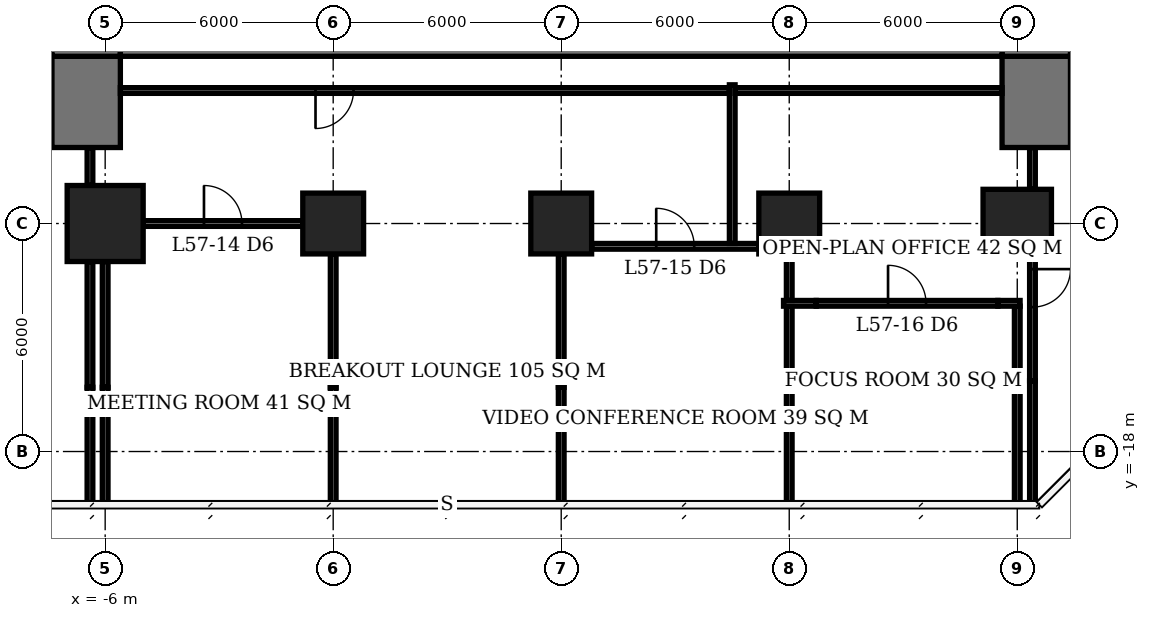
"""IFC4 building model, lengths in metres.
Left out: names, types, materials, properties, quantities, classifications, styles, units other than length and angle.
Written with IfcOpenShell. Run it as: python <this file> out.ifc"""

import sys

from ifc_helpers import new_model, si_unit, direction, frame, frame_2d, origin, origin_2d, place, context, subcontext, project, spatial, rectangle, extrude, element, fill, save


model = new_model("IFC4")
c1 = context("Model", 3, precision=1e-05, world=origin(), true_north=direction((0.0, 1.0)))
c2 = subcontext(c1, "Body", "Model", "MODEL_VIEW")
j1 = project(units=[si_unit("LENGTHUNIT", "METRE"), si_unit("PLANEANGLEUNIT", "RADIAN")], contexts=[c1])
p1 = place(None, origin())
s1 = spatial("IfcSite", under=j1, at=p1, CompositionType="ELEMENT")
p2 = place(p1, origin())
s2 = spatial("IfcBuilding", under=s1, at=p2, CompositionType="ELEMENT")
p3 = place(p2, frame((0.0, 0.0, 231.8)))
s3 = spatial("IfcBuildingStorey", under=s2, at=p3, CompositionType="ELEMENT", Elevation=231.8)
p4 = place(p3, frame((-6.0, -12.0, 0.0), z_axis=(0.0, 0.0, 1.0), x_axis=(1.0, 0.0, 0.0)))
e1 = element("IfcColumn", 1, at=p4, inside=s3, PredefinedType="COLUMN", context=c2, shape_type="SweptSolid", body=[
    extrude(rectangle(XDim=2.0, YDim=2.0, at=origin_2d()), origin(), (0.0, 0.0, 1.0), 3.9),
])
for number, where, z_axis, x_axis in (
    (2, (0.0, -12.0, 0.0), (0.0, 0.0, 1.0), (1.0, 0.0, 0.0)),
    (3, (6.0, -12.0, 0.0), (0.0, 0.0, 1.0), (1.0, 0.0, 0.0)),
    (4, (12.0, -12.0, 0.0), (0.0, 0.0, 1.0), (1.0, 0.0, 0.0)),
):
    element("IfcColumn", number, at=place(p3, frame(where, z_axis=z_axis, x_axis=x_axis)), inside=s3, PredefinedType="COLUMN", context=c2, shape_type="SweptSolid", body=[
        extrude(rectangle(XDim=1.6, YDim=1.6, at=origin_2d()), origin(), (0.0, 0.0, 1.0), 3.9),
    ])
p5 = place(p3, frame((18.0, -12.0, 0.0), z_axis=(0.0, 0.0, 1.0), x_axis=(1.0, 0.0, 0.0)))
e5 = element("IfcColumn", 5, at=p5, inside=s3, PredefinedType="COLUMN", context=c2, shape_type="SweptSolid", body=[
    extrude(rectangle(XDim=1.8, YDim=1.8, at=origin_2d()), origin(), (0.0, 0.0, 1.0), 3.9),
])
p6 = place(p3, frame((-5.6, -6.6, 0.0), z_axis=(0.0, 0.0, 1.0), x_axis=(1.0, 0.0, 0.0)))
e6 = element("IfcWall", 6, at=p6, inside=s3, PredefinedType="SHEAR", context=c2, shape_type="SweptSolid", body=[
    extrude(rectangle(XDim=23.2, YDim=2.0, at=frame_2d((11.6, 0.0))), origin(), (0.0, 0.0, 1.0), 3.9),
])
p7 = place(p3, frame((-6.5, -7.6, 0.0), z_axis=(0.0, 0.0, 1.0), x_axis=(0.0, 1.0, 0.0)))
e7 = element("IfcWall", 7, at=p7, inside=s3, PredefinedType="SHEAR", context=c2, shape_type="SweptSolid", body=[
    extrude(rectangle(XDim=21.2, YDim=1.8, at=frame_2d((10.6, 0.0))), origin(), (0.0, 0.0, 1.0), 3.9),
])
p8 = place(p7, frame((7.8, 0.0, 0.0)))
e8 = element("IfcOpeningElement", 8, at=p8, cuts=e7, PredefinedType="OPENING", context=c2, shape_type="SweptSolid", body=[
    extrude(rectangle(XDim=1.8, YDim=2.4, at=frame_2d((0.9, 1.2))), frame((0.0, 0.91, 0.0), z_axis=(0.0, -1.0, 0.0), x_axis=(1.0, 0.0, 0.0)), (0.0, 0.0, 1.0), 1.82),
])
p9 = place(p3, frame((18.5, -7.6, 0.0), z_axis=(0.0, 0.0, 1.0), x_axis=(0.0, 1.0, 0.0)))
e9 = element("IfcWall", 9, at=p9, inside=s3, PredefinedType="SHEAR", context=c2, shape_type="SweptSolid", body=[
    extrude(rectangle(XDim=21.2, YDim=1.8, at=frame_2d((10.6, 0.0))), origin(), (0.0, 0.0, 1.0), 3.9),
])
p10 = place(p9, frame((9.2, 0.0, 0.0)))
e10 = element("IfcOpeningElement", 10, at=p10, cuts=e9, PredefinedType="OPENING", context=c2, shape_type="SweptSolid", body=[
    extrude(rectangle(XDim=1.8, YDim=2.4, at=frame_2d((0.9, 1.2))), frame((0.0, 0.91, 0.0), z_axis=(0.0, -1.0, 0.0), x_axis=(1.0, 0.0, 0.0)), (0.0, 0.0, 1.0), 1.82),
])
for number, where, z_axis, x_axis in (
    (11, (-6.5, -10.0, 0.0), (0.0, 0.0, 1.0), (0.0, 1.0, 0.0)),
    (12, (18.5, -10.0, 0.0), (0.0, 0.0, 1.0), (0.0, 1.0, 0.0)),
):
    element("IfcWall", number, at=place(p3, frame(where, z_axis=z_axis, x_axis=x_axis)), inside=s3, PredefinedType="SHEAR", context=c2, shape_type="SweptSolid", body=[
        extrude(rectangle(XDim=2.4, YDim=1.8, at=frame_2d((1.2, 0.0))), origin(), (0.0, 0.0, 1.0), 3.9),
    ])
p11 = place(p3, frame((11.85, -14.1, 0.0), z_axis=(0.0, 0.0, 1.0), x_axis=(1.0, 0.0, 0.0)))
e13 = element("IfcWall", 13, at=p11, inside=s3, PredefinedType="PARTITIONING", context=c2, shape_type="SweptSolid", body=[
    extrude(rectangle(XDim=0.86, YDim=0.15, at=frame_2d((0.43, 0.0))), origin(), (0.0, 0.0, 1.0), 2.65),
])
p12 = place(p3, frame((12.71, -14.1, 0.0), z_axis=(0.0, 0.0, 1.0), x_axis=(1.0, 0.0, 0.0)))
e14 = element("IfcWall", 14, at=p12, inside=s3, PredefinedType="PARTITIONING", context=c2, shape_type="SweptSolid", body=[
    extrude(rectangle(XDim=4.78, YDim=0.15, at=frame_2d((2.39, 0.0))), origin(), (0.0, 0.0, 1.0), 3.65),
])
p13 = place(p12, frame((1.89, 0.0, 0.0)))
e15 = element("IfcOpeningElement", 15, at=p13, cuts=e14, PredefinedType="OPENING", context=c2, shape_type="SweptSolid", body=[
    extrude(rectangle(XDim=1.0, YDim=2.1, at=frame_2d((0.5, 1.05))), frame((0.0, 0.085, 0.0), z_axis=(0.0, -1.0, 0.0), x_axis=(1.0, 0.0, 0.0)), (0.0, 0.0, 1.0), 0.17),
])
p14 = place(p3, frame((17.49, -14.1, 0.0), z_axis=(0.0, 0.0, 1.0), x_axis=(1.0, 0.0, 0.0)))
e16 = element("IfcWall", 16, at=p14, inside=s3, PredefinedType="PARTITIONING", context=c2, shape_type="SweptSolid", body=[
    extrude(rectangle(XDim=0.585, YDim=0.15, at=frame_2d((0.292, 0.0))), origin(), (0.0, 0.0, 1.0), 2.65),
])
p15 = place(p3, frame((6.8, -12.6, 0.0), z_axis=(0.0, 0.0, 1.0), x_axis=(1.0, 0.0, 0.0)))
e17 = element("IfcWall", 17, at=p15, inside=s3, PredefinedType="PARTITIONING", context=c2, shape_type="SweptSolid", body=[
    extrude(rectangle(XDim=4.4, YDim=0.15, at=frame_2d((2.2, 0.0))), origin(), (0.0, 0.0, 1.0), 3.65),
])
p16 = place(p15, frame((1.7, 0.0, 0.0)))
e18 = element("IfcOpeningElement", 18, at=p16, cuts=e17, PredefinedType="OPENING", context=c2, shape_type="SweptSolid", body=[
    extrude(rectangle(XDim=1.0, YDim=2.1, at=frame_2d((0.5, 1.05))), frame((0.0, 0.085, 0.0), z_axis=(0.0, -1.0, 0.0), x_axis=(1.0, 0.0, 0.0)), (0.0, 0.0, 1.0), 0.17),
])
p17 = place(p3, frame((-5.0, -12.0, 0.0), z_axis=(0.0, 0.0, 1.0), x_axis=(1.0, 0.0, 0.0)))
e19 = element("IfcWall", 19, at=p17, inside=s3, PredefinedType="PARTITIONING", context=c2, shape_type="SweptSolid", body=[
    extrude(rectangle(XDim=4.2, YDim=0.15, at=frame_2d((2.1, 0.0))), origin(), (0.0, 0.0, 1.0), 3.65),
])
p18 = place(p17, frame((1.6, 0.0, 0.0)))
e20 = element("IfcOpeningElement", 20, at=p18, cuts=e19, PredefinedType="OPENING", context=c2, shape_type="SweptSolid", body=[
    extrude(rectangle(XDim=1.0, YDim=2.1, at=frame_2d((0.5, 1.05))), frame((0.0, 0.085, 0.0), z_axis=(0.0, -1.0, 0.0), x_axis=(1.0, 0.0, 0.0)), (0.0, 0.0, 1.0), 0.17),
])
p19 = place(p3, frame((-6.0, -19.4, 0.0), z_axis=(0.0, 0.0, 1.0), x_axis=(0.0, 1.0, 0.0)))
e21 = element("IfcWall", 21, at=p19, inside=s3, PredefinedType="PARTITIONING", context=c2, shape_type="SweptSolid", body=[
    extrude(rectangle(XDim=3.09, YDim=0.15, at=frame_2d((1.545, 0.0))), origin(), (0.0, 0.0, 1.0), 3.65),
])
p20 = place(p3, frame((-6.0, -16.31, 0.0), z_axis=(0.0, 0.0, 1.0), x_axis=(0.0, 1.0, 0.0)))
e22 = element("IfcWall", 22, at=p20, inside=s3, PredefinedType="PARTITIONING", context=c2, shape_type="SweptSolid", body=[
    extrude(rectangle(XDim=3.31, YDim=0.15, at=frame_2d((1.655, 0.0))), origin(), (0.0, 0.0, 1.0), 2.65),
])
p21 = place(p3, frame((0.0, -19.35, 0.0), z_axis=(0.0, 0.0, 1.0), x_axis=(0.0, 1.0, 0.0)))
e23 = element("IfcWall", 23, at=p21, inside=s3, PredefinedType="PARTITIONING", context=c2, shape_type="SweptSolid", body=[
    extrude(rectangle(XDim=3.04, YDim=0.15, at=frame_2d((1.52, 0.0))), origin(), (0.0, 0.0, 1.0), 3.65),
])
p22 = place(p3, frame((0.0, -16.31, 0.0), z_axis=(0.0, 0.0, 1.0), x_axis=(0.0, 1.0, 0.0)))
e24 = element("IfcWall", 24, at=p22, inside=s3, PredefinedType="PARTITIONING", context=c2, shape_type="SweptSolid", body=[
    extrude(rectangle(XDim=3.51, YDim=0.15, at=frame_2d((1.755, 0.0))), origin(), (0.0, 0.0, 1.0), 2.65),
])
p23 = place(p3, frame((6.0, -19.35, 0.0), z_axis=(0.0, 0.0, 1.0), x_axis=(0.0, 1.0, 0.0)))
e25 = element("IfcWall", 25, at=p23, inside=s3, PredefinedType="PARTITIONING", context=c2, shape_type="SweptSolid", body=[
    extrude(rectangle(XDim=3.04, YDim=0.15, at=frame_2d((1.52, 0.0))), origin(), (0.0, 0.0, 1.0), 3.65),
])
p24 = place(p3, frame((6.0, -16.31, 0.0), z_axis=(0.0, 0.0, 1.0), x_axis=(0.0, 1.0, 0.0)))
e26 = element("IfcWall", 26, at=p24, inside=s3, PredefinedType="PARTITIONING", context=c2, shape_type="SweptSolid", body=[
    extrude(rectangle(XDim=3.51, YDim=0.15, at=frame_2d((1.755, 0.0))), origin(), (0.0, 0.0, 1.0), 2.65),
])
p25 = place(p3, frame((12.0, -19.4, 0.0), z_axis=(0.0, 0.0, 1.0), x_axis=(0.0, 1.0, 0.0)))
e27 = element("IfcWall", 27, at=p25, inside=s3, PredefinedType="PARTITIONING", context=c2, shape_type="SweptSolid", body=[
    extrude(rectangle(XDim=3.09, YDim=0.15, at=frame_2d((1.545, 0.0))), origin(), (0.0, 0.0, 1.0), 3.65),
])
p26 = place(p3, frame((12.0, -16.31, 0.0), z_axis=(0.0, 0.0, 1.0), x_axis=(0.0, 1.0, 0.0)))
e28 = element("IfcWall", 28, at=p26, inside=s3, PredefinedType="PARTITIONING", context=c2, shape_type="SweptSolid", body=[
    extrude(rectangle(XDim=2.135, YDim=0.15, at=frame_2d((1.067, 0.0))), origin(), (0.0, 0.0, 1.0), 2.65),
])
p27 = place(p3, frame((12.0, -14.025, 0.0), z_axis=(0.0, 0.0, 1.0), x_axis=(0.0, 1.0, 0.0)))
e29 = element("IfcWall", 29, at=p27, inside=s3, PredefinedType="PARTITIONING", context=c2, shape_type="SweptSolid", body=[
    extrude(rectangle(XDim=1.225, YDim=0.15, at=frame_2d((0.612, 0.0))), origin(), (0.0, 0.0, 1.0), 2.65),
])
p28 = place(p3, frame((18.0, -19.4, 0.0), z_axis=(0.0, 0.0, 1.0), x_axis=(0.0, 1.0, 0.0)))
e30 = element("IfcWall", 30, at=p28, inside=s3, PredefinedType="PARTITIONING", context=c2, shape_type="SweptSolid", body=[
    extrude(rectangle(XDim=3.09, YDim=0.15, at=frame_2d((1.545, 0.0))), origin(), (0.0, 0.0, 1.0), 3.65),
])
p29 = place(p3, frame((18.0, -16.31, 0.0), z_axis=(0.0, 0.0, 1.0), x_axis=(0.0, 1.0, 0.0)))
e31 = element("IfcWall", 31, at=p29, inside=s3, PredefinedType="PARTITIONING", context=c2, shape_type="SweptSolid", body=[
    extrude(rectangle(XDim=2.135, YDim=0.15, at=frame_2d((1.067, 0.0))), origin(), (0.0, 0.0, 1.0), 2.65),
])
p30 = place(p3, frame((-6.4, -19.35, 0.0), z_axis=(0.0, 0.0, 1.0), x_axis=(0.0, 1.0, 0.0)))
e32 = element("IfcWall", 32, at=p30, inside=s3, PredefinedType="PARTITIONING", context=c2, shape_type="SweptSolid", body=[
    extrude(rectangle(XDim=3.04, YDim=0.15, at=frame_2d((1.52, 0.0))), origin(), (0.0, 0.0, 1.0), 3.65),
])
p31 = place(p3, frame((-6.4, -16.31, 0.0), z_axis=(0.0, 0.0, 1.0), x_axis=(0.0, 1.0, 0.0)))
e33 = element("IfcWall", 33, at=p31, inside=s3, PredefinedType="PARTITIONING", context=c2, shape_type="SweptSolid", body=[
    extrude(rectangle(XDim=3.31, YDim=0.15, at=frame_2d((1.655, 0.0))), origin(), (0.0, 0.0, 1.0), 2.65),
])
p32 = place(p3, frame((-6.4, -11.0, 0.0), z_axis=(0.0, 0.0, 1.0), x_axis=(0.0, 1.0, 0.0)))
e34 = element("IfcWall", 34, at=p32, inside=s3, PredefinedType="PARTITIONING", context=c2, shape_type="SweptSolid", body=[
    extrude(rectangle(XDim=1.0, YDim=0.15, at=frame_2d((0.5, 0.0))), origin(), (0.0, 0.0, 1.0), 3.65),
])
p33 = place(p3, frame((10.425, -8.5, 0.0), z_axis=(0.0, 0.0, 1.0), x_axis=(-1.0, 0.0, 0.0)))
e35 = element("IfcWall", 35, at=p33, inside=s3, PredefinedType="PARTITIONING", context=c2, shape_type="SweptSolid", body=[
    extrude(rectangle(XDim=16.025, YDim=0.15, at=frame_2d((8.013, 0.0))), origin(), (0.0, 0.0, 1.0), 3.65),
])
p34 = place(p33, frame((9.89, 0.0, 0.0)))
e36 = element("IfcOpeningElement", 36, at=p34, cuts=e35, PredefinedType="OPENING", context=c2, shape_type="SweptSolid", body=[
    extrude(rectangle(XDim=1.0, YDim=2.1, at=frame_2d((0.5, 1.05))), frame((0.0, 0.085, 0.0), z_axis=(0.0, -1.0, 0.0), x_axis=(1.0, 0.0, 0.0)), (0.0, 0.0, 1.0), 0.17),
])
p35 = place(p3, frame((10.5, -12.525, 0.0), z_axis=(0.0, 0.0, 1.0), x_axis=(0.0, 1.0, 0.0)))
e37 = element("IfcWall", 37, at=p35, inside=s3, PredefinedType="PARTITIONING", context=c2, shape_type="SweptSolid", body=[
    extrude(rectangle(XDim=4.175, YDim=0.15, at=frame_2d((2.087, 0.0))), origin(), (0.0, 0.0, 1.0), 3.65),
])
p36 = place(p3, frame((10.575, -8.5, 0.0), z_axis=(0.0, 0.0, 1.0), x_axis=(1.0, 0.0, 0.0)))
e38 = element("IfcWall", 38, at=p36, inside=s3, PredefinedType="PARTITIONING", context=c2, shape_type="SweptSolid", body=[
    extrude(rectangle(XDim=7.025, YDim=0.15, at=frame_2d((3.513, 0.0))), origin(), (0.0, 0.0, 1.0), 3.65),
])
p37 = place(p3, frame((18.4, -19.4, 0.0), z_axis=(0.0, 0.0, 1.0), x_axis=(0.0, 1.0, 0.0)))
e39 = element("IfcWall", 39, at=p37, inside=s3, PredefinedType="PARTITIONING", context=c2, shape_type="SweptSolid", body=[
    extrude(rectangle(XDim=3.26, YDim=0.15, at=frame_2d((1.63, 0.0))), origin(), (0.0, 0.0, 1.0), 3.65),
])
p38 = place(p3, frame((18.4, -12.9, 0.0), z_axis=(0.0, 0.0, 1.0), x_axis=(0.0, -1.0, 0.0)))
e40 = element("IfcWall", 40, at=p38, inside=s3, PredefinedType="PARTITIONING", context=c2, shape_type="SweptSolid", body=[
    extrude(rectangle(XDim=3.24, YDim=0.15, at=frame_2d((1.62, 0.0))), origin(), (0.0, 0.0, 1.0), 2.65),
])
p39 = place(p38, frame((0.3, 0.0, 0.0)))
e41 = element("IfcOpeningElement", 41, at=p39, cuts=e40, PredefinedType="OPENING", context=c2, shape_type="SweptSolid", body=[
    extrude(rectangle(XDim=1.0, YDim=2.1, at=frame_2d((0.5, 1.05))), frame((0.0, 0.085, 0.0), z_axis=(0.0, -1.0, 0.0), x_axis=(1.0, 0.0, 0.0)), (0.0, 0.0, 1.0), 0.17),
])
p40 = place(p3, frame((18.4, -11.1, 0.0), z_axis=(0.0, 0.0, 1.0), x_axis=(0.0, 1.0, 0.0)))
e42 = element("IfcWall", 42, at=p40, inside=s3, PredefinedType="PARTITIONING", context=c2, shape_type="SweptSolid", body=[
    extrude(rectangle(XDim=1.1, YDim=0.15, at=frame_2d((0.55, 0.0))), origin(), (0.0, 0.0, 1.0), 3.65),
])
p41 = place(p18, origin())
e43 = element("IfcDoor", 43, at=p41, inside=s3, OperationType="SINGLE_SWING_LEFT", PredefinedType="DOOR", context=c2, shape_type="SweptSolid", body=[
    extrude(rectangle(XDim=1.0, YDim=2.1, at=frame_2d((0.5, 1.05))), frame((0.0, 0.025, 0.0), z_axis=(0.0, -1.0, 0.0), x_axis=(1.0, 0.0, 0.0)), (0.0, 0.0, 1.0), 0.05),
])
fill(e20, e43)
p42 = place(p16, origin())
e44 = element("IfcDoor", 44, at=p42, inside=s3, OperationType="SINGLE_SWING_LEFT", PredefinedType="DOOR", context=c2, shape_type="SweptSolid", body=[
    extrude(rectangle(XDim=1.0, YDim=2.1, at=frame_2d((0.5, 1.05))), frame((0.0, 0.025, 0.0), z_axis=(0.0, -1.0, 0.0), x_axis=(1.0, 0.0, 0.0)), (0.0, 0.0, 1.0), 0.05),
])
fill(e18, e44)
p43 = place(p13, origin())
e45 = element("IfcDoor", 45, at=p43, inside=s3, OperationType="SINGLE_SWING_LEFT", PredefinedType="DOOR", context=c2, shape_type="SweptSolid", body=[
    extrude(rectangle(XDim=1.0, YDim=2.1, at=frame_2d((0.5, 1.05))), frame((0.0, 0.025, 0.0), z_axis=(0.0, -1.0, 0.0), x_axis=(1.0, 0.0, 0.0)), (0.0, 0.0, 1.0), 0.05),
])
fill(e15, e45)
p44 = place(p34, origin())
e46 = element("IfcDoor", 46, at=p44, inside=s3, OperationType="SINGLE_SWING_RIGHT", PredefinedType="DOOR", context=c2, shape_type="SweptSolid", body=[
    extrude(rectangle(XDim=1.0, YDim=2.1, at=frame_2d((0.5, 1.05))), frame((0.0, 0.025, 0.0), z_axis=(0.0, -1.0, 0.0), x_axis=(1.0, 0.0, 0.0)), (0.0, 0.0, 1.0), 0.05),
])
fill(e36, e46)
p45 = place(p39, origin())
e47 = element("IfcDoor", 47, at=p45, inside=s3, OperationType="SINGLE_SWING_LEFT", PredefinedType="DOOR", context=c2, shape_type="SweptSolid", body=[
    extrude(rectangle(XDim=1.0, YDim=2.1, at=frame_2d((0.5, 1.05))), frame((0.0, 0.025, 0.0), z_axis=(0.0, -1.0, 0.0), x_axis=(1.0, 0.0, 0.0)), (0.0, 0.0, 1.0), 0.05),
])
fill(e41, e47)
save(model, sys.argv[1])
